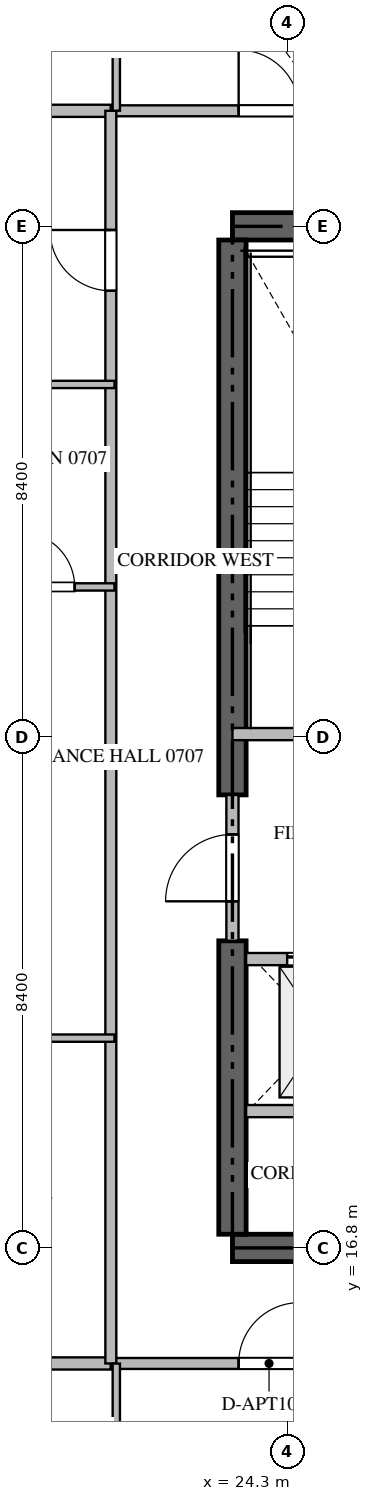
"""IFC4 building model, lengths in metres.
Left out: names, types, materials, properties, quantities, classifications, styles, units other than length and angle.
Written with IfcOpenShell. Run it as: python <this file> out.ifc"""

import sys

from ifc_helpers import new_model, si_unit, direction, frame, frame_2d, origin, place, context, subcontext, project, spatial, rectangle, extrude, source, transform, mapped, element, fill, save


model = new_model("IFC4")
c1 = context("Model", 3, precision=1e-05, world=origin(), true_north=direction((0.0, 1.0)))
c2 = subcontext(c1, "Body", "Model", "MODEL_VIEW")
j1 = project(units=[si_unit("LENGTHUNIT", "METRE"), si_unit("PLANEANGLEUNIT", "RADIAN")], contexts=[c1])
p1 = place(None, origin())
s1 = spatial("IfcSite", under=j1, at=p1, CompositionType="ELEMENT")
p2 = place(p1, origin())
s2 = spatial("IfcBuilding", under=s1, at=p2, CompositionType="ELEMENT")
p3 = place(p2, frame((0.0, 0.0, 34.2)))
s3 = spatial("IfcBuildingStorey", under=s2, at=p3, CompositionType="ELEMENT", Elevation=34.2)
for number, where, z_axis, x_axis in (
    (1, (23.4, 16.8, -0.26), (0.0, 0.0, 1.0), (1.0, 0.0, 0.0)),
    (2, (41.4, 33.6, -0.26), (0.0, 0.0, 1.0), (-1.0, 0.0, 0.0)),
):
    element("IfcWall", number, at=place(p3, frame(where, z_axis=z_axis, x_axis=x_axis)), inside=s3, PredefinedType="SHEAR", context=c2, shape_type="SweptSolid", body=[
        extrude(rectangle(XDim=18.0, YDim=0.45, at=frame_2d((9.0, 0.0))), origin(), (0.0, 0.0, 1.0), 3.748),
    ])
p4 = place(p3, frame((23.4, 17.025, -0.26), z_axis=(0.0, 0.0, 1.0), x_axis=(0.0, 1.0, 0.0)))
e3 = element("IfcWall", 3, at=p4, inside=s3, PredefinedType="SHEAR", context=c2, shape_type="SweptSolid", body=[
    extrude(rectangle(XDim=4.825, YDim=0.45, at=frame_2d((2.413, 0.0))), origin(), (0.0, 0.0, 1.0), 3.748),
])
p5 = place(p3, frame((23.4, 24.25, -0.26), z_axis=(0.0, 0.0, 1.0), x_axis=(0.0, 1.0, 0.0)))
e4 = element("IfcWall", 4, at=p5, inside=s3, PredefinedType="SHEAR", context=c2, shape_type="SweptSolid", body=[
    extrude(rectangle(XDim=9.125, YDim=0.45, at=frame_2d((4.562, 0.0))), origin(), (0.0, 0.0, 1.0), 3.748),
])
p6 = place(p3, frame((23.4, 25.25, 0.0), z_axis=(0.0, 0.0, 1.0), x_axis=(1.0, 0.0, 0.0)))
e5 = element("IfcWall", 5, at=p6, inside=s3, PredefinedType="STANDARD", context=c2, shape_type="SweptSolid", body=[
    extrude(rectangle(XDim=4.45, YDim=0.2, at=frame_2d((2.225, 0.0))), origin(), (0.0, 0.0, 1.0), 3.49),
])
p7 = place(p6, frame((1.65, 0.0, 0.0)))
e6 = element("IfcOpeningElement", 6, at=p7, cuts=e5, PredefinedType="OPENING", context=c2, shape_type="SweptSolid", body=[
    extrude(rectangle(XDim=1.1, YDim=2.15, at=frame_2d((0.55, 1.075))), frame((0.0, 0.11, 0.0), z_axis=(0.0, -1.0, 0.0), x_axis=(1.0, 0.0, 0.0)), (0.0, 0.0, 1.0), 0.22),
])
p8 = place(p3, frame((23.625, 21.55, 0.0), z_axis=(0.0, 0.0, 1.0), x_axis=(1.0, 0.0, 0.0)))
e7 = element("IfcWall", 7, at=p8, inside=s3, PredefinedType="STANDARD", context=c2, shape_type="SweptSolid", body=[
    extrude(rectangle(XDim=2.425, YDim=0.2, at=frame_2d((1.212, 0.0))), origin(), (0.0, 0.0, 1.0), 3.49),
])
p9 = place(p8, frame((0.675, 0.0, 0.0)))
e8 = element("IfcOpeningElement", 8, at=p9, cuts=e7, PredefinedType="OPENING", context=c2, shape_type="SweptSolid", body=[
    extrude(rectangle(XDim=1.2, YDim=2.2, at=frame_2d((0.6, 1.1))), frame((0.0, 0.11, 0.0), z_axis=(0.0, -1.0, 0.0), x_axis=(1.0, 0.0, 0.0)), (0.0, 0.0, 1.0), 0.22),
])
p10 = place(p3, frame((23.625, 19.05, 0.0), z_axis=(0.0, 0.0, 1.0), x_axis=(1.0, 0.0, 0.0)))
e9 = element("IfcWall", 9, at=p10, inside=s3, PredefinedType="STANDARD", context=c2, shape_type="SweptSolid", body=[
    extrude(rectangle(XDim=2.425, YDim=0.2, at=frame_2d((1.212, 0.0))), origin(), (0.0, 0.0, 1.0), 3.49),
])
p11 = place(p3, frame((23.4, 21.852, 0.0), z_axis=(0.0, 0.0, 1.0), x_axis=(0.0, 1.0, 0.0)))
e10 = element("IfcWall", 10, at=p11, inside=s3, PredefinedType="STANDARD", context=c2, shape_type="SweptSolid", body=[
    extrude(rectangle(XDim=2.396, YDim=0.2, at=frame_2d((1.198, 0.0))), origin(), (0.0, 0.0, 1.0), 3.49),
])
p12 = place(p11, frame((0.648, 0.0, 0.0)))
e11 = element("IfcOpeningElement", 11, at=p12, cuts=e10, PredefinedType="OPENING", context=c2, shape_type="SweptSolid", body=[
    extrude(rectangle(XDim=1.1, YDim=2.15, at=frame_2d((0.55, 1.075))), frame((0.0, 0.11, 0.0), z_axis=(0.0, -1.0, 0.0), x_axis=(1.0, 0.0, 0.0)), (0.0, 0.0, 1.0), 0.22),
])
for number, where, z_axis, x_axis in (
    (12, (6.082, 14.9, 0.0), (0.0, 0.0, 1.0), (1.0, 0.0, 0.0)),
    (13, (6.082, 35.5, 0.0), (0.0, 0.0, 1.0), (1.0, 0.0, 0.0)),
):
    element("IfcWall", number, at=place(p3, frame(where, z_axis=z_axis, x_axis=x_axis)), inside=s3, PredefinedType="PARTITIONING", context=c2, shape_type="SweptSolid", body=[
        extrude(rectangle(XDim=15.318, YDim=0.2, at=frame_2d((7.659, 0.0))), origin(), (0.0, 0.0, 1.0), 3.49),
    ])
p13 = place(p3, frame((21.402, 14.9, 0.0), z_axis=(0.0, 0.0, 1.0), x_axis=(1.0, 0.0, 0.0)))
e14 = element("IfcWall", 14, at=p13, inside=s3, PredefinedType="PARTITIONING", context=c2, shape_type="SweptSolid", body=[
    extrude(rectangle(XDim=21.996, YDim=0.18, at=frame_2d((10.998, 0.0))), origin(), (0.0, 0.0, 1.0), 3.49),
])
p14 = place(p13, frame((2.1, 0.0, 0.0)))
e15 = element("IfcOpeningElement", 15, at=p14, cuts=e14, PredefinedType="OPENING", context=c2, shape_type="SweptSolid", body=[
    extrude(rectangle(XDim=1.0, YDim=2.15, at=frame_2d((0.5, 1.075))), frame((0.0, 0.1, 0.0), z_axis=(0.0, -1.0, 0.0), x_axis=(1.0, 0.0, 0.0)), (0.0, 0.0, 1.0), 0.2),
])
p15 = place(p13, frame((6.719, 0.0, 0.0)))
e16 = element("IfcOpeningElement", 16, at=p15, cuts=e14, PredefinedType="OPENING", context=c2, shape_type="SweptSolid", body=[
    extrude(rectangle(XDim=1.0, YDim=2.15, at=frame_2d((0.5, 1.075))), frame((0.0, 0.1, 0.0), z_axis=(0.0, -1.0, 0.0), x_axis=(1.0, 0.0, 0.0)), (0.0, 0.0, 1.0), 0.2),
])
p16 = place(p13, frame((18.896, 0.0, 0.0)))
e17 = element("IfcOpeningElement", 17, at=p16, cuts=e14, PredefinedType="OPENING", context=c2, shape_type="SweptSolid", body=[
    extrude(rectangle(XDim=1.0, YDim=2.15, at=frame_2d((0.5, 1.075))), frame((0.0, 0.1, 0.0), z_axis=(0.0, -1.0, 0.0), x_axis=(1.0, 0.0, 0.0)), (0.0, 0.0, 1.0), 0.2),
])
p17 = place(p3, frame((21.402, 35.5, 0.0), z_axis=(0.0, 0.0, 1.0), x_axis=(1.0, 0.0, 0.0)))
e18 = element("IfcWall", 18, at=p17, inside=s3, PredefinedType="PARTITIONING", context=c2, shape_type="SweptSolid", body=[
    extrude(rectangle(XDim=21.996, YDim=0.18, at=frame_2d((10.998, 0.0))), origin(), (0.0, 0.0, 1.0), 3.49),
])
p18 = place(p17, frame((2.1, 0.0, 0.0)))
e19 = element("IfcOpeningElement", 19, at=p18, cuts=e18, PredefinedType="OPENING", context=c2, shape_type="SweptSolid", body=[
    extrude(rectangle(XDim=1.0, YDim=2.15, at=frame_2d((0.5, 1.075))), frame((0.0, 0.1, 0.0), z_axis=(0.0, -1.0, 0.0), x_axis=(1.0, 0.0, 0.0)), (0.0, 0.0, 1.0), 0.2),
])
p19 = place(p17, frame((14.277, 0.0, 0.0)))
e20 = element("IfcOpeningElement", 20, at=p19, cuts=e18, PredefinedType="OPENING", context=c2, shape_type="SweptSolid", body=[
    extrude(rectangle(XDim=1.0, YDim=2.15, at=frame_2d((0.5, 1.075))), frame((0.0, 0.1, 0.0), z_axis=(0.0, -1.0, 0.0), x_axis=(1.0, 0.0, 0.0)), (0.0, 0.0, 1.0), 0.2),
])
p20 = place(p17, frame((18.896, 0.0, 0.0)))
e21 = element("IfcOpeningElement", 21, at=p20, cuts=e18, PredefinedType="OPENING", context=c2, shape_type="SweptSolid", body=[
    extrude(rectangle(XDim=1.0, YDim=2.15, at=frame_2d((0.5, 1.075))), frame((0.0, 0.1, 0.0), z_axis=(0.0, -1.0, 0.0), x_axis=(1.0, 0.0, 0.0)), (0.0, 0.0, 1.0), 0.2),
])
p21 = place(p3, frame((21.4, 14.9, 0.0), z_axis=(0.0, 0.0, 1.0), x_axis=(0.0, 1.0, 0.0)))
e22 = element("IfcWall", 22, at=p21, inside=s3, PredefinedType="PARTITIONING", context=c2, shape_type="SweptSolid", body=[
    extrude(rectangle(XDim=20.6, YDim=0.18, at=frame_2d((10.3, 0.0))), origin(), (0.0, 0.0, 1.0), 3.49),
])
p22 = place(p21, frame((17.64, 0.0, 0.0)))
e23 = element("IfcOpeningElement", 23, at=p22, cuts=e22, PredefinedType="OPENING", context=c2, shape_type="SweptSolid", body=[
    extrude(rectangle(XDim=1.0, YDim=2.15, at=frame_2d((0.5, 1.075))), frame((0.0, 0.1, 0.0), z_axis=(0.0, -1.0, 0.0), x_axis=(1.0, 0.0, 0.0)), (0.0, 0.0, 1.0), 0.2),
])
for number, where, z_axis, x_axis in (
    (24, (21.49, 12.15, 0.0), (0.0, 0.0, 1.0), (0.0, 1.0, 0.0)),
    (25, (21.49, 38.25, 0.0), (0.0, 0.0, 1.0), (0.0, -1.0, 0.0)),
):
    element("IfcWall", number, at=place(p3, frame(where, z_axis=z_axis, x_axis=x_axis)), inside=s3, PredefinedType="PARTITIONING", context=c2, shape_type="SweptSolid", body=[
        extrude(rectangle(XDim=2.748, YDim=0.12, at=frame_2d((1.374, 0.0))), origin(), (0.0, 0.0, 1.0), 3.49),
    ])
p23 = place(p3, frame((18.65, 31.0, 0.0), z_axis=(0.0, 0.0, 1.0), x_axis=(1.0, 0.0, 0.0)))
e26 = element("IfcWall", 26, at=p23, inside=s3, PredefinedType="PARTITIONING", context=c2, shape_type="SweptSolid", body=[
    extrude(rectangle(XDim=2.81, YDim=0.12, at=frame_2d((1.405, 0.0))), origin(), (0.0, 0.0, 1.0), 3.49),
])
p24 = place(p3, frame((19.25, 27.67, 0.0), z_axis=(0.0, 0.0, 1.0), x_axis=(1.0, 0.0, 0.0)))
e27 = element("IfcWall", 27, at=p24, inside=s3, PredefinedType="PARTITIONING", context=c2, shape_type="SweptSolid", body=[
    extrude(rectangle(XDim=2.21, YDim=0.12, at=frame_2d((1.105, 0.0))), origin(), (0.0, 0.0, 1.0), 3.49),
])
p25 = place(p24, frame((0.655, 0.0, 0.0)))
e28 = element("IfcOpeningElement", 28, at=p25, cuts=e27, PredefinedType="OPENING", context=c2, shape_type="SweptSolid", body=[
    extrude(rectangle(XDim=0.9, YDim=2.1, at=frame_2d((0.45, 1.05))), frame((0.0, 0.07, 0.0), z_axis=(0.0, -1.0, 0.0), x_axis=(1.0, 0.0, 0.0)), (0.0, 0.0, 1.0), 0.14),
])
p26 = place(p3, frame((19.252, 20.25, 0.0), z_axis=(0.0, 0.0, 1.0), x_axis=(1.0, 0.0, 0.0)))
e29 = element("IfcWall", 29, at=p26, inside=s3, PredefinedType="PARTITIONING", context=c2, shape_type="SweptSolid", body=[
    extrude(rectangle(XDim=2.208, YDim=0.12, at=frame_2d((1.104, 0.0))), origin(), (0.0, 0.0, 1.0), 3.49),
])
m1 = source(origin(), c2, "Body", "SweptSolid", [
    extrude(rectangle(XDim=1.2, YDim=2.2, at=frame_2d((0.6, 1.1))), frame((0.0, 0.025, 0.0), z_axis=(0.0, -1.0, 0.0), x_axis=(1.0, 0.0, 0.0)), (0.0, 0.0, 1.0), 0.05),
])
p27 = place(p9, origin())
e30 = element("IfcDoor", 30, at=p27, inside=s3, OperationType="DOUBLE_DOOR_SLIDING", PredefinedType="DOOR", context=c2, shape_type="MappedRepresentation", body=[
    mapped(m1, transform((0.0, 0.0, 0.0), scale=1.0)),
])
fill(e8, e30)
m2 = source(origin(), c2, "Body", "SweptSolid", [
    extrude(rectangle(XDim=1.1, YDim=2.15, at=frame_2d((0.55, 1.075))), frame((0.0, 0.025, 0.0), z_axis=(0.0, -1.0, 0.0), x_axis=(1.0, 0.0, 0.0)), (0.0, 0.0, 1.0), 0.05),
])
p28 = place(p12, origin())
e31 = element("IfcDoor", 31, at=p28, inside=s3, OperationType="SINGLE_SWING_LEFT", PredefinedType="DOOR", context=c2, shape_type="MappedRepresentation", body=[
    mapped(m2, transform((0.0, 0.0, 0.0), scale=1.0)),
])
fill(e11, e31)
m3 = source(origin(), c2, "Body", "SweptSolid", [
    extrude(rectangle(XDim=1.0, YDim=2.15, at=frame_2d((0.5, 1.075))), frame((0.0, 0.025, 0.0), z_axis=(0.0, -1.0, 0.0), x_axis=(1.0, 0.0, 0.0)), (0.0, 0.0, 1.0), 0.05),
])
p29 = place(p14, origin())
e32 = element("IfcDoor", 32, at=p29, inside=s3, OperationType="SINGLE_SWING_RIGHT", PredefinedType="DOOR", context=c2, shape_type="MappedRepresentation", body=[
    mapped(m3, transform((0.0, 0.0, 0.0), scale=1.0)),
])
fill(e15, e32)
p30 = place(p18, origin())
e33 = element("IfcDoor", 33, at=p30, inside=s3, OperationType="SINGLE_SWING_LEFT", PredefinedType="DOOR", context=c2, shape_type="MappedRepresentation", body=[
    mapped(m3, transform((0.0, 0.0, 0.0), scale=1.0)),
])
fill(e19, e33)
p31 = place(p22, origin())
e34 = element("IfcDoor", 34, at=p31, inside=s3, OperationType="SINGLE_SWING_RIGHT", PredefinedType="DOOR", context=c2, shape_type="MappedRepresentation", body=[
    mapped(m3, transform((0.0, 0.0, 0.0), scale=1.0)),
])
fill(e23, e34)
m4 = source(origin(), c2, "Body", "SweptSolid", [
    extrude(rectangle(XDim=0.9, YDim=2.1, at=frame_2d((0.45, 1.05))), frame((0.0, 0.025, 0.0), z_axis=(0.0, -1.0, 0.0), x_axis=(1.0, 0.0, 0.0)), (0.0, 0.0, 1.0), 0.05),
])
p32 = place(p25, origin())
e35 = element("IfcDoor", 35, at=p32, inside=s3, OperationType="SINGLE_SWING_LEFT", PredefinedType="DOOR", context=c2, shape_type="MappedRepresentation", body=[
    mapped(m4, transform((0.0, 0.0, 0.0), scale=1.0)),
])
fill(e28, e35)
save(model, sys.argv[1])
